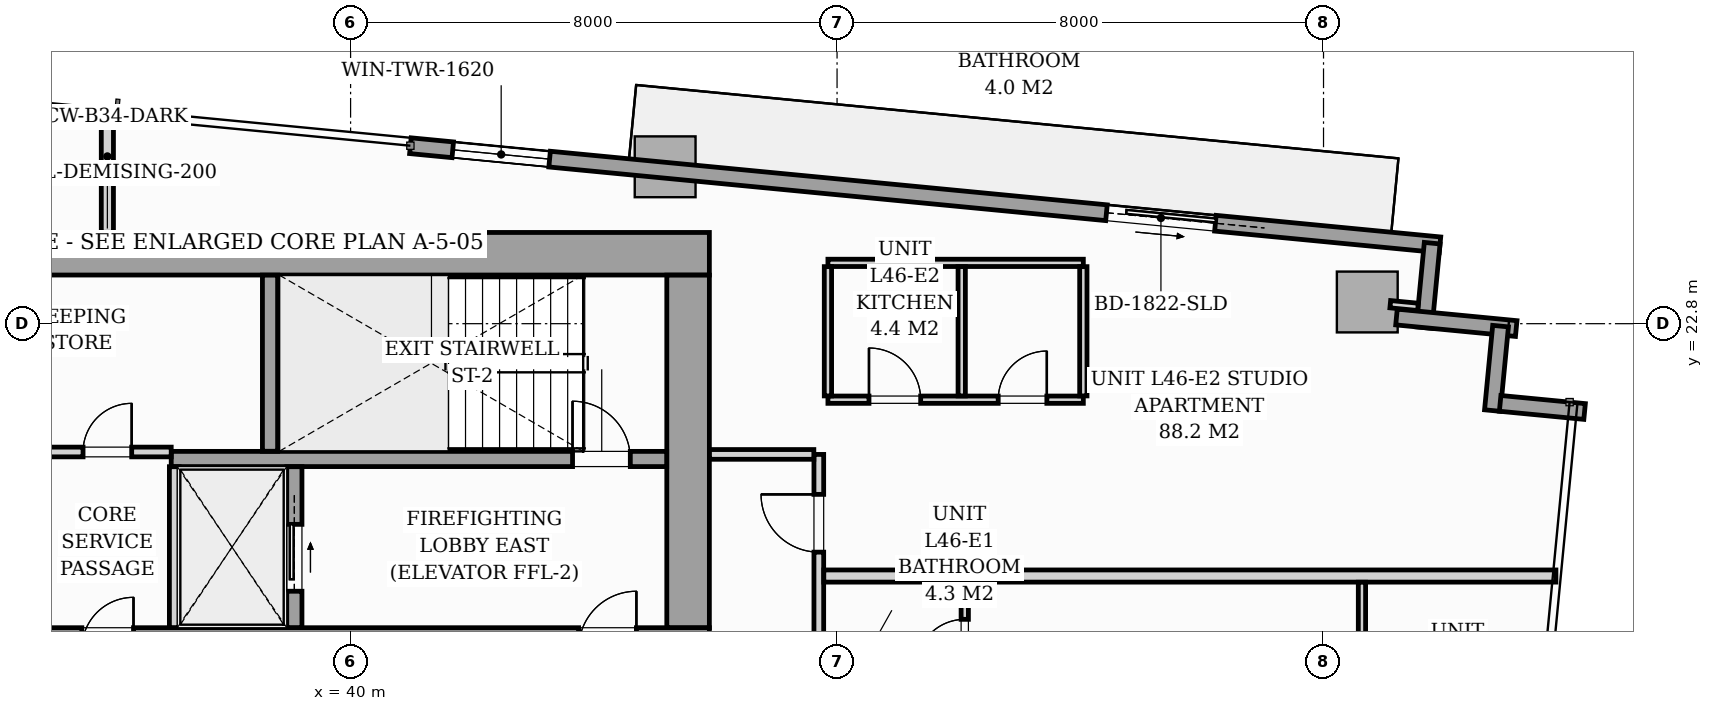
"""IFC4 building model, lengths in metres.
Left out: names, types, materials, properties, quantities, classifications, styles, units other than length and angle.
Written with IfcOpenShell. Run it as: python <this file> out.ifc"""

import sys

from ifc_helpers import new_model, si_unit, direction, frame, frame_2d, origin, origin_2d, place, context, subcontext, project, spatial, rectangle, i_section, extrude, source, transform, mapped, element, fill, save


model = new_model("IFC4")
c1 = context("Model", 3, precision=1e-05, world=origin(), true_north=direction((0.0, 1.0)))
c2 = subcontext(c1, "Body", "Model", "MODEL_VIEW")
j1 = project(units=[si_unit("LENGTHUNIT", "METRE"), si_unit("PLANEANGLEUNIT", "RADIAN")], contexts=[c1])
p1 = place(None, origin())
s1 = spatial("IfcSite", under=j1, at=p1, CompositionType="ELEMENT")
p2 = place(p1, origin())
s2 = spatial("IfcBuilding", under=s1, at=p2, CompositionType="ELEMENT")
p3 = place(p2, frame((0.0, 0.0, 159.8)))
s3 = spatial("IfcBuildingStorey", under=s2, at=p3, CompositionType="ELEMENT", Elevation=159.8)
m1 = source(origin(), c2, "Body", "SweptSolid", [
    extrude(i_section(OverallWidth=0.421, OverallDepth=0.465, WebThickness=0.045, FlangeThickness=0.073, FilletRadius=0.018, at=origin_2d()), origin(), (0.0, 0.0, 1.0), 3.196),
])
for number, where, z_axis, x_axis in (
    (1, (38.88, 24.0, 0.002), (0.0, 0.0, 1.0), (1.0, 0.0, 0.0)),
    (2, (45.6, 24.0, 0.002), (0.0, 0.0, 1.0), (1.0, 0.0, 0.0)),
):
    element("IfcColumn", number, at=place(p3, frame(where, z_axis=z_axis, x_axis=x_axis)), inside=s3, PredefinedType="PILASTER", context=c2, shape_type="MappedRepresentation", body=[
        mapped(m1, transform((0.0, 0.0, 0.0), scale=1.0)),
    ])
m2 = source(origin(), c2, "Body", "SweptSolid", [
    extrude(rectangle(XDim=1.0, YDim=1.0, at=origin_2d()), origin(), (0.0, 0.0, 1.0), 3.194),
])
for number, where, z_axis, x_axis in (
    (3, (45.173, 25.38, 0.002), (0.0, 0.0, 1.0), (0.995, -0.096, 0.0)),
    (4, (56.719, 23.157, 0.002), (0.0, 0.0, 1.0), (0.995, -0.096, 0.0)),
):
    element("IfcColumn", number, at=place(p3, frame(where, z_axis=z_axis, x_axis=x_axis)), inside=s3, PredefinedType="COLUMN", context=c2, shape_type="MappedRepresentation", body=[
        mapped(m2, transform((0.0, 0.0, 0.0), scale=1.0)),
    ])
p4 = place(p3, frame((40.983, 25.727, 0.0), z_axis=(0.0, 0.0, 1.0), x_axis=(0.995395844771, -0.095849424686, 0.0)))
e5 = element("IfcWall", 5, at=p4, inside=s3, PredefinedType="STANDARD", context=c2, shape_type="SweptSolid", body=[
    extrude(rectangle(XDim=17.01, YDim=0.26, at=frame_2d((8.505, 0.0))), origin(), (0.0, 0.0, 1.0), 2.9),
])
p5 = place(p4, frame((11.5, 0.0, 0.0)))
e6 = element("IfcOpeningElement", 6, at=p5, cuts=e5, PredefinedType="OPENING", context=c2, shape_type="SweptSolid", body=[
    extrude(rectangle(XDim=1.8, YDim=2.06, at=frame_2d((0.9, 1.03))), frame((0.0, 0.14, 0.0), z_axis=(0.0, -1.0, 0.0), x_axis=(1.0, 0.0, 0.0)), (0.0, 0.0, 1.0), 0.28),
])
p6 = place(p4, frame((0.7, 0.0, 0.65)))
e7 = element("IfcOpeningElement", 7, at=p6, cuts=e5, PredefinedType="OPENING", context=c2, shape_type="SweptSolid", body=[
    extrude(rectangle(XDim=1.6, YDim=1.5, at=frame_2d((0.8, 0.75))), frame((0.0, 0.14, 0.0), z_axis=(0.0, -1.0, 0.0), x_axis=(1.0, 0.0, 0.0)), (0.0, 0.0, 1.0), 0.28),
])
p7 = place(p3, frame((57.787, 24.124, 0.0), z_axis=(0.0, 0.0, 1.0), x_axis=(-0.095915846097, -0.995389446633, 0.0)))
e8 = element("IfcWall", 8, at=p7, inside=s3, PredefinedType="STANDARD", context=c2, shape_type="SweptSolid", body=[
    extrude(rectangle(XDim=1.395, YDim=0.26, at=frame_2d((0.697, 0.0))), origin(), (0.0, 0.0, 1.0), 2.9),
])
p8 = place(p3, frame((57.2, 22.909, 0.0), z_axis=(0.0, 0.0, 1.0), x_axis=(0.995401789159, -0.095787672171, 0.0)))
e9 = element("IfcWall", 9, at=p8, inside=s3, PredefinedType="STANDARD", context=c2, shape_type="SweptSolid", body=[
    extrude(rectangle(XDim=1.978, YDim=0.26, at=frame_2d((0.989, 0.0))), origin(), (0.0, 0.0, 1.0), 2.9),
])
for number, where, z_axis, x_axis in (
    (10, (58.912, 22.76, 0.0), (0.0, 0.0, 1.0), (-0.096, -0.995, 0.0)),
    (11, (58.905, 21.49, 0.0), (0.0, 0.0, 1.0), (0.995, -0.096, 0.0)),
):
    element("IfcWall", number, at=place(p3, frame(where, z_axis=z_axis, x_axis=x_axis)), inside=s3, PredefinedType="STANDARD", context=c2, shape_type="SweptSolid", body=[
        extrude(rectangle(XDim=1.395, YDim=0.26, at=frame_2d((0.698, 0.0))), origin(), (0.0, 0.0, 1.0), 2.9),
    ])
p9 = place(p3, frame((26.1, 17.45, 0.0), z_axis=(0.0, 0.0, 1.0), x_axis=(1.0, 0.0, 0.0)))
e12 = element("IfcWall", 12, at=p9, inside=s3, PredefinedType="SHEAR", context=c2, shape_type="SweptSolid", body=[
    extrude(rectangle(XDim=19.8, YDim=0.7, at=frame_2d((9.9, 0.0))), origin(), (0.0, 0.0, 1.0), 3.2),
])
p10 = place(p9, frame((1.05, 0.0, 0.0)))
e13 = element("IfcOpeningElement", 13, at=p10, cuts=e12, PredefinedType="OPENING", context=c2, shape_type="SweptSolid", body=[
    extrude(rectangle(XDim=0.95, YDim=2.06, at=frame_2d((0.475, 1.03))), frame((0.0, 0.36, 0.0), z_axis=(0.0, -1.0, 0.0), x_axis=(1.0, 0.0, 0.0)), (0.0, 0.0, 1.0), 0.72),
])
p11 = place(p9, frame((9.48, 0.0, 0.0)))
e14 = element("IfcOpeningElement", 14, at=p11, cuts=e12, PredefinedType="OPENING", context=c2, shape_type="SweptSolid", body=[
    extrude(rectangle(XDim=0.85, YDim=2.0, at=frame_2d((0.425, 1.0))), frame((0.0, 0.36, 0.0), z_axis=(0.0, -1.0, 0.0), x_axis=(1.0, 0.0, 0.0)), (0.0, 0.0, 1.0), 0.72),
])
p12 = place(p9, frame((17.65, 0.0, 0.0)))
e15 = element("IfcOpeningElement", 15, at=p12, cuts=e12, PredefinedType="OPENING", context=c2, shape_type="SweptSolid", body=[
    extrude(rectangle(XDim=0.95, YDim=2.06, at=frame_2d((0.475, 1.03))), frame((0.0, 0.36, 0.0), z_axis=(0.0, -1.0, 0.0), x_axis=(1.0, 0.0, 0.0)), (0.0, 0.0, 1.0), 0.72),
])
p13 = place(p3, frame((26.1, 23.95, 0.0), z_axis=(0.0, 0.0, 1.0), x_axis=(1.0, 0.0, 0.0)))
e16 = element("IfcWall", 16, at=p13, inside=s3, PredefinedType="SHEAR", context=c2, shape_type="SweptSolid", body=[
    extrude(rectangle(XDim=19.8, YDim=0.7, at=frame_2d((9.9, 0.0))), origin(), (0.0, 0.0, 1.0), 3.2),
])
p14 = place(p3, frame((45.55, 17.802, 0.0), z_axis=(0.0, 0.0, 1.0), x_axis=(0.0, 1.0, 0.0)))
e17 = element("IfcWall", 17, at=p14, inside=s3, PredefinedType="SHEAR", context=c2, shape_type="SweptSolid", body=[
    extrude(rectangle(XDim=5.796, YDim=0.7, at=frame_2d((2.898, 0.0))), origin(), (0.0, 0.0, 1.0), 3.2),
])
p15 = place(p3, frame((37.05, 20.575, 0.0), z_axis=(0.0, 0.0, 1.0), x_axis=(1.0, 0.0, 0.0)))
e18 = element("IfcWall", 18, at=p15, inside=s3, PredefinedType="SOLIDWALL", context=c2, shape_type="SweptSolid", body=[
    extrude(rectangle(XDim=8.148, YDim=0.25, at=frame_2d((4.074, 0.0))), origin(), (0.0, 0.0, 1.0), 3.2),
])
p16 = place(p15, frame((6.6, 0.0, 0.0)))
e19 = element("IfcOpeningElement", 19, at=p16, cuts=e18, PredefinedType="OPENING", context=c2, shape_type="SweptSolid", body=[
    extrude(rectangle(XDim=0.95, YDim=2.06, at=frame_2d((0.475, 1.03))), frame((0.0, 0.135, 0.0), z_axis=(0.0, -1.0, 0.0), x_axis=(1.0, 0.0, 0.0)), (0.0, 0.0, 1.0), 0.27),
])
p17 = place(p3, frame((38.675, 20.702, 0.0), z_axis=(0.0, 0.0, 1.0), x_axis=(0.0, 1.0, 0.0)))
e20 = element("IfcWall", 20, at=p17, inside=s3, PredefinedType="SOLIDWALL", context=c2, shape_type="SweptSolid", body=[
    extrude(rectangle(XDim=2.896, YDim=0.25, at=frame_2d((1.448, 0.0))), origin(), (0.0, 0.0, 1.0), 3.2),
])
p18 = place(p3, frame((37.1, 17.802, 0.0), z_axis=(0.0, 0.0, 1.0), x_axis=(0.0, 1.0, 0.0)))
e21 = element("IfcWall", 21, at=p18, inside=s3, PredefinedType="PARTITIONING", context=c2, shape_type="SweptSolid", body=[
    extrude(rectangle(XDim=2.646, YDim=0.16, at=frame_2d((1.323, 0.0))), origin(), (0.0, 0.0, 1.0), 2.9),
])
p19 = place(p3, frame((39.075, 17.802, 0.0), z_axis=(0.0, 0.0, 1.0), x_axis=(0.0, 1.0, 0.0)))
e22 = element("IfcWall", 22, at=p19, inside=s3, PredefinedType="SOLIDWALL", context=c2, shape_type="SweptSolid", body=[
    extrude(rectangle(XDim=2.646, YDim=0.25, at=frame_2d((1.323, 0.0))), origin(), (0.0, 0.0, 1.0), 3.2),
])
p20 = place(p19, frame((0.598, 0.0, 0.0)))
e23 = element("IfcOpeningElement", 23, at=p20, cuts=e22, PredefinedType="OPENING", context=c2, shape_type="SweptSolid", body=[
    extrude(rectangle(XDim=1.1, YDim=2.08, at=frame_2d((0.55, 1.04))), frame((0.0, 0.135, 0.0), z_axis=(0.0, -1.0, 0.0), x_axis=(1.0, 0.0, 0.0)), (0.0, 0.0, 1.0), 0.27),
])
p21 = place(p3, frame((34.95, 20.69, 0.0), z_axis=(0.0, 0.0, 1.0), x_axis=(1.0, 0.0, 0.0)))
e24 = element("IfcWall", 24, at=p21, inside=s3, PredefinedType="PARTITIONING", context=c2, shape_type="SweptSolid", body=[
    extrude(rectangle(XDim=2.1, YDim=0.16, at=frame_2d((1.05, 0.0))), origin(), (0.0, 0.0, 1.0), 2.9),
])
p22 = place(p21, frame((0.65, 0.0, 0.0)))
e25 = element("IfcOpeningElement", 25, at=p22, cuts=e24, PredefinedType="OPENING", context=c2, shape_type="SweptSolid", body=[
    extrude(rectangle(XDim=0.8, YDim=2.05, at=frame_2d((0.4, 1.025))), frame((0.0, 0.09, 0.0), z_axis=(0.0, -1.0, 0.0), x_axis=(1.0, 0.0, 0.0)), (0.0, 0.0, 1.0), 0.18),
])
p23 = place(p3, frame((47.7, 12.732, 0.0), z_axis=(0.0, 0.0, 1.0), x_axis=(0.0, 1.0, 0.0)))
e26 = element("IfcWall", 26, at=p23, inside=s3, PredefinedType="PARTITIONING", context=c2, shape_type="SweptSolid", body=[
    extrude(rectangle(XDim=7.918, YDim=0.16, at=frame_2d((3.959, 0.0))), origin(), (0.0, 0.0, 1.0), 2.9),
])
p24 = place(p23, frame((0.493, 0.0, 0.0)))
e27 = element("IfcOpeningElement", 27, at=p24, cuts=e26, PredefinedType="OPENING", context=c2, shape_type="SweptSolid", body=[
    extrude(rectangle(XDim=0.85, YDim=2.0, at=frame_2d((0.425, 1.0))), frame((0.0, 0.09, 0.0), z_axis=(0.0, -1.0, 0.0), x_axis=(1.0, 0.0, 0.0)), (0.0, 0.0, 1.0), 0.18),
])
p25 = place(p23, frame((6.311, 0.0, 0.0)))
e28 = element("IfcOpeningElement", 28, at=p25, cuts=e26, PredefinedType="OPENING", context=c2, shape_type="SweptSolid", body=[
    extrude(rectangle(XDim=0.95, YDim=2.06, at=frame_2d((0.475, 1.03))), frame((0.0, 0.09, 0.0), z_axis=(0.0, -1.0, 0.0), x_axis=(1.0, 0.0, 0.0)), (0.0, 0.0, 1.0), 0.18),
])
p26 = place(p3, frame((36.0, 24.302, 0.0), z_axis=(0.0, 0.0, 1.0), x_axis=(0.0, 1.0, 0.0)))
e29 = element("IfcWall", 29, at=p26, inside=s3, PredefinedType="PARTITIONING", context=c2, shape_type="SweptSolid", body=[
    extrude(rectangle(XDim=1.955, YDim=0.2, at=frame_2d((0.978, 0.0))), origin(), (0.0, 0.0, 1.0), 2.9),
])
p27 = place(p3, frame((45.902, 20.65, 0.0), z_axis=(0.0, 0.0, 1.0), x_axis=(1.0, 0.0, 0.0)))
e30 = element("IfcWall", 30, at=p27, inside=s3, PredefinedType="PARTITIONING", context=c2, shape_type="SweptSolid", body=[
    extrude(rectangle(XDim=1.716, YDim=0.16, at=frame_2d((0.858, 0.0))), origin(), (0.0, 0.0, 1.0), 2.9),
])
p28 = place(p3, frame((47.782, 18.65, 0.0), z_axis=(0.0, 0.0, 1.0), x_axis=(1.0, 0.0, 0.0)))
e31 = element("IfcWall", 31, at=p28, inside=s3, PredefinedType="PARTITIONING", context=c2, shape_type="SweptSolid", body=[
    extrude(rectangle(XDim=12.04, YDim=0.2, at=frame_2d((6.02, 0.0))), origin(), (0.0, 0.0, 1.0), 2.9),
])
p29 = place(p3, frame((50.1, 14.5, 0.0), z_axis=(0.0, 0.0, 1.0), x_axis=(0.0, 1.0, 0.0)))
e32 = element("IfcWall", 32, at=p29, inside=s3, PredefinedType="PARTITIONING", context=c2, shape_type="SweptSolid", body=[
    extrude(rectangle(XDim=4.048, YDim=0.12, at=frame_2d((2.024, 0.0))), origin(), (0.0, 0.0, 1.0), 2.9),
])
p30 = place(p29, frame((0.587, 0.0, 0.0)))
e33 = element("IfcOpeningElement", 33, at=p30, cuts=e32, PredefinedType="OPENING", context=c2, shape_type="SweptSolid", body=[
    extrude(rectangle(XDim=0.8, YDim=2.0, at=frame_2d((0.4, 1.0))), frame((0.0, 0.07, 0.0), z_axis=(0.0, -1.0, 0.0), x_axis=(1.0, 0.0, 0.0)), (0.0, 0.0, 1.0), 0.14),
])
p31 = place(p29, frame((2.638, 0.0, 0.0)))
e34 = element("IfcOpeningElement", 34, at=p31, cuts=e32, PredefinedType="OPENING", context=c2, shape_type="SweptSolid", body=[
    extrude(rectangle(XDim=0.8, YDim=2.02, at=frame_2d((0.4, 1.01))), frame((0.0, 0.07, 0.0), z_axis=(0.0, -1.0, 0.0), x_axis=(1.0, 0.0, 0.0)), (0.0, 0.0, 1.0), 0.14),
])
p32 = place(p3, frame((56.632, 6.179, 0.0), z_axis=(0.0, 0.0, 1.0), x_axis=(0.0, 1.0, 0.0)))
e35 = element("IfcWall", 35, at=p32, inside=s3, PredefinedType="PARTITIONING", context=c2, shape_type="SweptSolid", body=[
    extrude(rectangle(XDim=12.369, YDim=0.12, at=frame_2d((6.185, 0.0))), origin(), (0.0, 0.0, 1.0), 2.9),
])
p33 = place(p32, frame((5.624, 0.0, 0.0)))
e36 = element("IfcOpeningElement", 36, at=p33, cuts=e35, PredefinedType="OPENING", context=c2, shape_type="SweptSolid", body=[
    extrude(rectangle(XDim=0.85, YDim=2.05, at=frame_2d((0.425, 1.025))), frame((0.0, 0.07, 0.0), z_axis=(0.0, -1.0, 0.0), x_axis=(1.0, 0.0, 0.0)), (0.0, 0.0, 1.0), 0.14),
])
p34 = place(p3, frame((47.85, 21.55, 0.0), z_axis=(0.0, 0.0, 1.0), x_axis=(1.0, 0.0, 0.0)))
e37 = element("IfcWall", 37, at=p34, inside=s3, PredefinedType="PARTITIONING", context=c2, shape_type="SweptSolid", body=[
    extrude(rectangle(XDim=4.2, YDim=0.12, at=frame_2d((2.1, 0.0))), origin(), (0.0, 0.0, 1.0), 2.9),
])
p35 = place(p34, frame((0.675, 0.0, 0.0)))
e38 = element("IfcOpeningElement", 38, at=p35, cuts=e37, PredefinedType="OPENING", context=c2, shape_type="SweptSolid", body=[
    extrude(rectangle(XDim=0.85, YDim=2.05, at=frame_2d((0.425, 1.025))), frame((0.0, 0.07, 0.0), z_axis=(0.0, -1.0, 0.0), x_axis=(1.0, 0.0, 0.0)), (0.0, 0.0, 1.0), 0.14),
])
p36 = place(p34, frame((2.8, 0.0, 0.0)))
e39 = element("IfcOpeningElement", 39, at=p36, cuts=e37, PredefinedType="OPENING", context=c2, shape_type="SweptSolid", body=[
    extrude(rectangle(XDim=0.8, YDim=2.02, at=frame_2d((0.4, 1.01))), frame((0.0, 0.07, 0.0), z_axis=(0.0, -1.0, 0.0), x_axis=(1.0, 0.0, 0.0)), (0.0, 0.0, 1.0), 0.14),
])
p37 = place(p3, frame((47.85, 23.8, 0.0), z_axis=(0.0, 0.0, 1.0), x_axis=(1.0, 0.0, 0.0)))
e40 = element("IfcWall", 40, at=p37, inside=s3, PredefinedType="PARTITIONING", context=c2, shape_type="SweptSolid", body=[
    extrude(rectangle(XDim=4.2, YDim=0.12, at=frame_2d((2.1, 0.0))), origin(), (0.0, 0.0, 1.0), 2.176),
])
for number, where, z_axis, x_axis in (
    (41, (47.85, 21.612, 0.0), (0.0, 0.0, 1.0), (0.0, 1.0, 0.0)),
    (42, (50.05, 21.612, 0.0), (0.0, 0.0, 1.0), (0.0, 1.0, 0.0)),
    (43, (52.05, 21.612, 0.0), (0.0, 0.0, 1.0), (0.0, 1.0, 0.0)),
):
    element("IfcWall", number, at=place(p3, frame(where, z_axis=z_axis, x_axis=x_axis)), inside=s3, PredefinedType="PARTITIONING", context=c2, shape_type="SweptSolid", body=[
        extrude(rectangle(XDim=2.126, YDim=0.12, at=frame_2d((1.063, 0.0))), origin(), (0.0, 0.0, 1.0), 2.9),
    ])
p38 = place(p3, frame((57.098, 23.12, 0.0), z_axis=(0.0, 0.0, 1.0), x_axis=(0.995384576284, -0.09596637586, 0.0)))
e44 = element("IfcWall", 44, at=p38, inside=s3, PredefinedType="PARTITIONING", context=c2, shape_type="SweptSolid", body=[
    extrude(rectangle(XDim=0.458, YDim=0.12, at=frame_2d((0.229, 0.0))), origin(), (0.0, 0.0, 1.0), 2.9),
])
m3 = source(origin(), c2, "Body", "SweptSolid", [
    extrude(rectangle(XDim=1.8, YDim=2.06, at=frame_2d((0.9, 1.03))), frame((0.0, 0.025, 0.0), z_axis=(0.0, -1.0, 0.0), x_axis=(1.0, 0.0, 0.0)), (0.0, 0.0, 1.0), 0.05),
])
p39 = place(p5, origin())
e45 = element("IfcDoor", 45, at=p39, inside=s3, OperationType="SLIDING_TO_RIGHT", PredefinedType="DOOR", context=c2, shape_type="MappedRepresentation", body=[
    mapped(m3, transform((0.0, 0.0, 0.0), scale=1.0)),
])
fill(e6, e45)
m4 = source(origin(), c2, "Body", "SweptSolid", [
    extrude(rectangle(XDim=1.6, YDim=1.5, at=frame_2d((0.8, 0.75))), frame((0.0, 0.03, 0.0), z_axis=(0.0, -1.0, 0.0), x_axis=(1.0, 0.0, 0.0)), (0.0, 0.0, 1.0), 0.06),
])
p40 = place(p6, origin())
e46 = element("IfcWindow", 46, at=p40, inside=s3, PartitioningType="SINGLE_PANEL", PredefinedType="WINDOW", context=c2, shape_type="MappedRepresentation", body=[
    mapped(m4, transform((0.0, 0.0, 0.0), scale=1.0)),
])
fill(e7, e46)
m5 = source(origin(), c2, "Body", "SweptSolid", [
    extrude(rectangle(XDim=0.95, YDim=2.06, at=frame_2d((0.475, 1.03))), frame((0.0, 0.025, 0.0), z_axis=(0.0, -1.0, 0.0), x_axis=(1.0, 0.0, 0.0)), (0.0, 0.0, 1.0), 0.05),
])
p41 = place(p16, origin())
e47 = element("IfcDoor", 47, at=p41, inside=s3, OperationType="SINGLE_SWING_LEFT", PredefinedType="DOOR", context=c2, shape_type="MappedRepresentation", body=[
    mapped(m5, transform((0.0, 0.0, 0.0), scale=1.0)),
])
fill(e19, e47)
m6 = source(origin(), c2, "Body", "SweptSolid", [
    extrude(rectangle(XDim=1.1, YDim=2.08, at=frame_2d((0.55, 1.04))), frame((0.0, 0.025, 0.0), z_axis=(0.0, -1.0, 0.0), x_axis=(1.0, 0.0, 0.0)), (0.0, 0.0, 1.0), 0.05),
])
p42 = place(p20, origin())
e48 = element("IfcDoor", 48, at=p42, inside=s3, OperationType="SLIDING_TO_RIGHT", PredefinedType="DOOR", context=c2, shape_type="MappedRepresentation", body=[
    mapped(m6, transform((0.0, 0.0, 0.0), scale=1.0)),
])
fill(e23, e48)
m7 = source(origin(), c2, "Body", "SweptSolid", [
    extrude(rectangle(XDim=0.8, YDim=2.05, at=frame_2d((0.4, 1.025))), frame((0.0, 0.025, 0.0), z_axis=(0.0, -1.0, 0.0), x_axis=(1.0, 0.0, 0.0)), (0.0, 0.0, 1.0), 0.05),
])
p43 = place(p22, origin())
e49 = element("IfcDoor", 49, at=p43, inside=s3, OperationType="SINGLE_SWING_RIGHT", PredefinedType="DOOR", context=c2, shape_type="MappedRepresentation", body=[
    mapped(m7, transform((0.0, 0.0, 0.0), scale=1.0)),
])
fill(e25, e49)
m8 = source(origin(), c2, "Body", "SweptSolid", [
    extrude(rectangle(XDim=0.8, YDim=2.02, at=frame_2d((0.4, 1.01))), frame((0.0, 0.025, 0.0), z_axis=(0.0, -1.0, 0.0), x_axis=(1.0, 0.0, 0.0)), (0.0, 0.0, 1.0), 0.05),
])
p44 = place(p31, origin())
e50 = element("IfcDoor", 50, at=p44, inside=s3, OperationType="SINGLE_SWING_LEFT", PredefinedType="DOOR", context=c2, shape_type="MappedRepresentation", body=[
    mapped(m8, transform((0.0, 0.0, 0.0), scale=1.0)),
])
fill(e34, e50)
m9 = source(origin(), c2, "Body", "SweptSolid", [
    extrude(rectangle(XDim=0.95, YDim=2.06, at=frame_2d((0.475, 1.03))), frame((0.0, 0.025, 0.0), z_axis=(0.0, -1.0, 0.0), x_axis=(1.0, 0.0, 0.0)), (0.0, 0.0, 1.0), 0.05),
])
p45 = place(p25, origin())
e51 = element("IfcDoor", 51, at=p45, inside=s3, OperationType="SINGLE_SWING_RIGHT", PredefinedType="DOOR", context=c2, shape_type="MappedRepresentation", body=[
    mapped(m9, transform((0.0, 0.0, 0.0), scale=1.0)),
])
fill(e28, e51)
m10 = source(origin(), c2, "Body", "SweptSolid", [
    extrude(rectangle(XDim=0.85, YDim=2.05, at=frame_2d((0.425, 1.025))), frame((0.0, 0.025, 0.0), z_axis=(0.0, -1.0, 0.0), x_axis=(1.0, 0.0, 0.0)), (0.0, 0.0, 1.0), 0.05),
])
p46 = place(p35, origin())
e52 = element("IfcDoor", 52, at=p46, inside=s3, OperationType="SINGLE_SWING_LEFT", PredefinedType="DOOR", context=c2, shape_type="MappedRepresentation", body=[
    mapped(m10, transform((0.0, 0.0, 0.0), scale=1.0)),
])
fill(e38, e52)
p47 = place(p36, origin())
e53 = element("IfcDoor", 53, at=p47, inside=s3, OperationType="SINGLE_SWING_RIGHT", PredefinedType="DOOR", context=c2, shape_type="MappedRepresentation", body=[
    mapped(m8, transform((0.0, 0.0, 0.0), scale=1.0)),
])
fill(e39, e53)
save(model, sys.argv[1])
